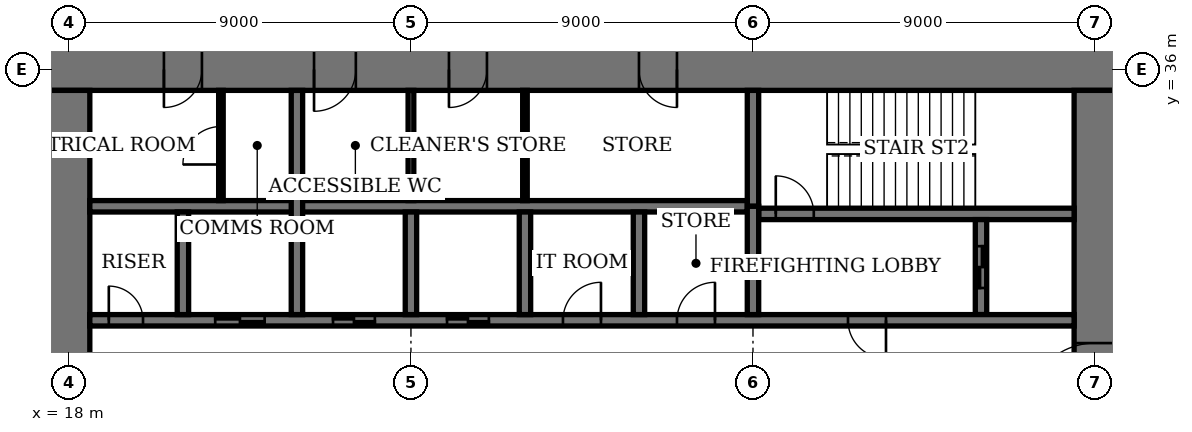
"""IFC4 building model, lengths in metres.
Left out: names, types, materials, properties, quantities, classifications, styles, units other than length and angle.
Written with IfcOpenShell. Run it as: python <this file> out.ifc"""

import sys

from ifc_helpers import new_model, si_unit, direction, frame, frame_2d, origin, place, context, subcontext, project, spatial, rectangle, extrude, element, fill, save


model = new_model("IFC4")
c1 = context("Model", 3, precision=1e-05, world=origin(), true_north=direction((0.0, 1.0)))
c2 = subcontext(c1, "Body", "Model", "MODEL_VIEW")
j1 = project(units=[si_unit("LENGTHUNIT", "METRE"), si_unit("PLANEANGLEUNIT", "RADIAN")], contexts=[c1])
p1 = place(None, origin())
s1 = spatial("IfcSite", under=j1, at=p1, CompositionType="ELEMENT")
p2 = place(p1, origin())
s2 = spatial("IfcBuilding", under=s1, at=p2, CompositionType="ELEMENT")
p3 = place(p2, frame((0.0, 0.0, 166.2)))
s3 = spatial("IfcBuildingStorey", under=s2, at=p3, CompositionType="ELEMENT", Elevation=166.2)
p4 = place(p3, frame((45.55, 36.0, 0.0), z_axis=(0.0, 0.0, 1.0), x_axis=(-1.0, 0.0, 0.0)))
e1 = element("IfcWall", 1, at=p4, inside=s3, PredefinedType="SHEAR", context=c2, shape_type="SweptSolid", body=[
    extrude(rectangle(XDim=28.1, YDim=1.1, at=frame_2d((14.05, 0.0))), origin(), (0.0, 0.0, 1.0), 4.0),
])
p5 = place(p4, frame((11.55, 0.0, 0.0)))
e2 = element("IfcOpeningElement", 2, at=p5, cuts=e1, PredefinedType="OPENING", context=c2, shape_type="SweptSolid", body=[
    extrude(rectangle(XDim=1.0, YDim=2.4, at=frame_2d((0.5, 1.2))), frame((0.0, 0.56, 0.0), z_axis=(0.0, -1.0, 0.0), x_axis=(1.0, 0.0, 0.0)), (0.0, 0.0, 1.0), 1.12),
])
p6 = place(p4, frame((16.55, 0.0, 0.0)))
e3 = element("IfcOpeningElement", 3, at=p6, cuts=e1, PredefinedType="OPENING", context=c2, shape_type="SweptSolid", body=[
    extrude(rectangle(XDim=1.0, YDim=2.4, at=frame_2d((0.5, 1.2))), frame((0.0, 0.56, 0.0), z_axis=(0.0, -1.0, 0.0), x_axis=(1.0, 0.0, 0.0)), (0.0, 0.0, 1.0), 1.12),
])
p7 = place(p4, frame((20.0, 0.0, 0.0)))
e4 = element("IfcOpeningElement", 4, at=p7, cuts=e1, PredefinedType="OPENING", context=c2, shape_type="SweptSolid", body=[
    extrude(rectangle(XDim=1.1, YDim=2.4, at=frame_2d((0.55, 1.2))), frame((0.0, 0.56, 0.0), z_axis=(0.0, -1.0, 0.0), x_axis=(1.0, 0.0, 0.0)), (0.0, 0.0, 1.0), 1.12),
])
p8 = place(p4, frame((24.05, 0.0, 0.0)))
e5 = element("IfcOpeningElement", 5, at=p8, cuts=e1, PredefinedType="OPENING", context=c2, shape_type="SweptSolid", body=[
    extrude(rectangle(XDim=1.0, YDim=2.4, at=frame_2d((0.5, 1.2))), frame((0.0, 0.56, 0.0), z_axis=(0.0, -1.0, 0.0), x_axis=(1.0, 0.0, 0.0)), (0.0, 0.0, 1.0), 1.12),
])
p9 = place(p3, frame((18.0, 35.45, 0.0), z_axis=(0.0, 0.0, 1.0), x_axis=(0.0, -1.0, 0.0)))
e6 = element("IfcWall", 6, at=p9, inside=s3, PredefinedType="SHEAR", context=c2, shape_type="SweptSolid", body=[
    extrude(rectangle(XDim=16.9, YDim=1.1, at=frame_2d((8.45, 0.0))), origin(), (0.0, 0.0, 1.0), 4.0),
])
p10 = place(p9, frame((8.45, 0.0, 0.0)))
e7 = element("IfcOpeningElement", 7, at=p10, cuts=e6, PredefinedType="OPENING", context=c2, shape_type="SweptSolid", body=[
    extrude(rectangle(XDim=1.8, YDim=2.4, at=frame_2d((0.9, 1.2))), frame((0.0, 0.56, 0.0), z_axis=(0.0, -1.0, 0.0), x_axis=(1.0, 0.0, 0.0)), (0.0, 0.0, 1.0), 1.12),
])
p11 = place(p3, frame((45.0, 18.55, 0.0), z_axis=(0.0, 0.0, 1.0), x_axis=(0.0, 1.0, 0.0)))
e8 = element("IfcWall", 8, at=p11, inside=s3, PredefinedType="SHEAR", context=c2, shape_type="SweptSolid", body=[
    extrude(rectangle(XDim=16.9, YDim=1.1, at=frame_2d((8.45, 0.0))), origin(), (0.0, 0.0, 1.0), 4.0),
])
p12 = place(p11, frame((8.45, 0.0, 0.0)))
e9 = element("IfcOpeningElement", 9, at=p12, cuts=e8, PredefinedType="OPENING", context=c2, shape_type="SweptSolid", body=[
    extrude(rectangle(XDim=1.8, YDim=2.4, at=frame_2d((0.9, 1.2))), frame((0.0, 0.56, 0.0), z_axis=(0.0, -1.0, 0.0), x_axis=(1.0, 0.0, 0.0)), (0.0, 0.0, 1.0), 1.12),
])
p13 = place(p3, frame((36.15, 32.2, 0.0), z_axis=(0.0, 0.0, 1.0), x_axis=(1.0, 0.0, 0.0)))
e10 = element("IfcWall", 10, at=p13, inside=s3, PredefinedType="SHEAR", context=c2, shape_type="SweptSolid", body=[
    extrude(rectangle(XDim=8.3, YDim=0.3, at=frame_2d((4.15, 0.0))), origin(), (0.0, 0.0, 1.0), 4.0),
])
p14 = place(p13, frame((0.45, 0.0, 0.0)))
e11 = element("IfcOpeningElement", 11, at=p14, cuts=e10, PredefinedType="OPENING", context=c2, shape_type="SweptSolid", body=[
    extrude(rectangle(XDim=1.0, YDim=2.4, at=frame_2d((0.5, 1.2))), frame((0.0, 0.16, 0.0), z_axis=(0.0, -1.0, 0.0), x_axis=(1.0, 0.0, 0.0)), (0.0, 0.0, 1.0), 0.32),
])
p15 = place(p3, frame((36.0, 32.4, 0.0), z_axis=(0.0, 0.0, 1.0), x_axis=(0.0, 1.0, 0.0)))
e12 = element("IfcWall", 12, at=p15, inside=s3, PredefinedType="SHEAR", context=c2, shape_type="SweptSolid", body=[
    extrude(rectangle(XDim=3.05, YDim=0.3, at=frame_2d((1.525, 0.0))), origin(), (0.0, 0.0, 1.0), 4.0),
])
p16 = place(p3, frame((42.0, 29.55, 0.0), z_axis=(0.0, 0.0, 1.0), x_axis=(0.0, 1.0, 0.0)))
e13 = element("IfcWall", 13, at=p16, inside=s3, PredefinedType="SHEAR", context=c2, shape_type="SweptSolid", body=[
    extrude(rectangle(XDim=2.5, YDim=0.3, at=frame_2d((1.25, 0.0))), origin(), (0.0, 0.0, 1.0), 4.0),
])
p17 = place(p16, frame((0.7, 0.0, 0.0)))
e14 = element("IfcOpeningElement", 14, at=p17, cuts=e13, PredefinedType="OPENING", context=c2, shape_type="SweptSolid", body=[
    extrude(rectangle(XDim=1.1, YDim=2.4, at=frame_2d((0.55, 1.2))), frame((0.0, 0.16, 0.0), z_axis=(0.0, -1.0, 0.0), x_axis=(1.0, 0.0, 0.0)), (0.0, 0.0, 1.0), 0.32),
])
p18 = place(p3, frame((18.55, 29.4, 0.0), z_axis=(0.0, 0.0, 1.0), x_axis=(1.0, 0.0, 0.0)))
e15 = element("IfcWall", 15, at=p18, inside=s3, PredefinedType="SHEAR", context=c2, shape_type="SweptSolid", body=[
    extrude(rectangle(XDim=25.9, YDim=0.3, at=frame_2d((12.95, 0.0))), origin(), (0.0, 0.0, 1.0), 4.0),
])
p19 = place(p18, frame((19.95, 0.0, 0.0)))
e16 = element("IfcOpeningElement", 16, at=p19, cuts=e15, PredefinedType="OPENING", context=c2, shape_type="SweptSolid", body=[
    extrude(rectangle(XDim=1.0, YDim=2.4, at=frame_2d((0.5, 1.2))), frame((0.0, 0.16, 0.0), z_axis=(0.0, -1.0, 0.0), x_axis=(1.0, 0.0, 0.0)), (0.0, 0.0, 1.0), 0.32),
])
p20 = place(p18, frame((0.5, 0.0, 0.0)))
e17 = element("IfcOpeningElement", 17, at=p20, cuts=e15, PredefinedType="OPENING", context=c2, shape_type="SweptSolid", body=[
    extrude(rectangle(XDim=0.9, YDim=2.1, at=frame_2d((0.45, 1.05))), frame((0.0, 0.16, 0.0), z_axis=(0.0, -1.0, 0.0), x_axis=(1.0, 0.0, 0.0)), (0.0, 0.0, 1.0), 0.32),
])
p21 = place(p18, frame((15.45, 0.0, 0.0)))
e18 = element("IfcOpeningElement", 18, at=p21, cuts=e15, PredefinedType="OPENING", context=c2, shape_type="SweptSolid", body=[
    extrude(rectangle(XDim=1.0, YDim=2.4, at=frame_2d((0.5, 1.2))), frame((0.0, 0.16, 0.0), z_axis=(0.0, -1.0, 0.0), x_axis=(1.0, 0.0, 0.0)), (0.0, 0.0, 1.0), 0.32),
])
p22 = place(p18, frame((12.45, 0.0, 0.0)))
e19 = element("IfcOpeningElement", 19, at=p22, cuts=e15, PredefinedType="OPENING", context=c2, shape_type="SweptSolid", body=[
    extrude(rectangle(XDim=1.0, YDim=2.4, at=frame_2d((0.5, 1.2))), frame((0.0, 0.16, 0.0), z_axis=(0.0, -1.0, 0.0), x_axis=(1.0, 0.0, 0.0)), (0.0, 0.0, 1.0), 0.32),
])
p23 = place(p18, frame((9.4, 0.0, 0.0)))
e20 = element("IfcOpeningElement", 20, at=p23, cuts=e15, PredefinedType="OPENING", context=c2, shape_type="SweptSolid", body=[
    extrude(rectangle(XDim=1.1, YDim=2.4, at=frame_2d((0.55, 1.2))), frame((0.0, 0.16, 0.0), z_axis=(0.0, -1.0, 0.0), x_axis=(1.0, 0.0, 0.0)), (0.0, 0.0, 1.0), 0.32),
])
p24 = place(p18, frame((6.4, 0.0, 0.0)))
e21 = element("IfcOpeningElement", 21, at=p24, cuts=e15, PredefinedType="OPENING", context=c2, shape_type="SweptSolid", body=[
    extrude(rectangle(XDim=1.1, YDim=2.4, at=frame_2d((0.55, 1.2))), frame((0.0, 0.16, 0.0), z_axis=(0.0, -1.0, 0.0), x_axis=(1.0, 0.0, 0.0)), (0.0, 0.0, 1.0), 0.32),
])
p25 = place(p18, frame((3.3, 0.0, 0.0)))
e22 = element("IfcOpeningElement", 22, at=p25, cuts=e15, PredefinedType="OPENING", context=c2, shape_type="SweptSolid", body=[
    extrude(rectangle(XDim=1.3, YDim=2.4, at=frame_2d((0.65, 1.2))), frame((0.0, 0.16, 0.0), z_axis=(0.0, -1.0, 0.0), x_axis=(1.0, 0.0, 0.0)), (0.0, 0.0, 1.0), 0.32),
])
p26 = place(p3, frame((18.55, 32.4, 0.0), z_axis=(0.0, 0.0, 1.0), x_axis=(1.0, 0.0, 0.0)))
e23 = element("IfcWall", 23, at=p26, inside=s3, PredefinedType="SHEAR", context=c2, shape_type="SweptSolid", body=[
    extrude(rectangle(XDim=17.3, YDim=0.3, at=frame_2d((8.65, 0.0))), origin(), (0.0, 0.0, 1.0), 4.0),
])
for number, where, z_axis, x_axis in (
    (24, (33.0, 29.55, 0.0), (0.0, 0.0, 1.0), (0.0, 1.0, 0.0)),
    (25, (30.0, 29.55, 0.0), (0.0, 0.0, 1.0), (0.0, 1.0, 0.0)),
    (26, (27.0, 29.55, 0.0), (0.0, 0.0, 1.0), (0.0, 1.0, 0.0)),
):
    element("IfcWall", number, at=place(p3, frame(where, z_axis=z_axis, x_axis=x_axis)), inside=s3, PredefinedType="SHEAR", context=c2, shape_type="SweptSolid", body=[
        extrude(rectangle(XDim=2.7, YDim=0.3, at=frame_2d((1.35, 0.0))), origin(), (0.0, 0.0, 1.0), 4.0),
    ])
p27 = place(p3, frame((24.0, 29.55, 0.0), z_axis=(0.0, 0.0, 1.0), x_axis=(0.0, 1.0, 0.0)))
e27 = element("IfcWall", 27, at=p27, inside=s3, PredefinedType="SHEAR", context=c2, shape_type="SweptSolid", body=[
    extrude(rectangle(XDim=5.9, YDim=0.3, at=frame_2d((2.95, 0.0))), origin(), (0.0, 0.0, 1.0), 4.0),
])
p28 = place(p3, frame((21.0, 29.55, 0.0), z_axis=(0.0, 0.0, 1.0), x_axis=(0.0, 1.0, 0.0)))
e28 = element("IfcWall", 28, at=p28, inside=s3, PredefinedType="SHEAR", context=c2, shape_type="SweptSolid", body=[
    extrude(rectangle(XDim=2.7, YDim=0.3, at=frame_2d((1.35, 0.0))), origin(), (0.0, 0.0, 1.0), 4.0),
])
p29 = place(p3, frame((36.0, 29.55, 0.0), z_axis=(0.0, 0.0, 1.0), x_axis=(0.0, 1.0, 0.0)))
e29 = element("IfcWall", 29, at=p29, inside=s3, PredefinedType="SHEAR", context=c2, shape_type="SweptSolid", body=[
    extrude(rectangle(XDim=2.85, YDim=0.3, at=frame_2d((1.425, 0.0))), origin(), (0.0, 0.0, 1.0), 4.0),
])
p30 = place(p3, frame((30.0, 32.55, 0.0), z_axis=(0.0, 0.0, 1.0), x_axis=(0.0, 1.0, 0.0)))
e30 = element("IfcWall", 30, at=p30, inside=s3, PredefinedType="PARTITIONING", context=c2, shape_type="SweptSolid", body=[
    extrude(rectangle(XDim=2.9, YDim=0.12, at=frame_2d((1.45, 0.0))), origin(), (0.0, 0.0, 1.0), 3.75),
])
p31 = place(p3, frame((27.0, 32.55, 0.0), z_axis=(0.0, 0.0, 1.0), x_axis=(0.0, 1.0, 0.0)))
e31 = element("IfcWall", 31, at=p31, inside=s3, PredefinedType="PARTITIONING", context=c2, shape_type="SweptSolid", body=[
    extrude(rectangle(XDim=2.9, YDim=0.15, at=frame_2d((1.45, 0.0))), origin(), (0.0, 0.0, 1.0), 3.75),
])
p32 = place(p3, frame((22.0, 32.55, 0.0), z_axis=(0.0, 0.0, 1.0), x_axis=(0.0, 1.0, 0.0)))
e32 = element("IfcWall", 32, at=p32, inside=s3, PredefinedType="PARTITIONING", context=c2, shape_type="SweptSolid", body=[
    extrude(rectangle(XDim=2.9, YDim=0.12, at=frame_2d((1.45, 0.0))), origin(), (0.0, 0.0, 1.0), 3.75),
])
p33 = place(p32, frame((0.95, 0.0, 0.0)))
e33 = element("IfcOpeningElement", 33, at=p33, cuts=e32, PredefinedType="OPENING", context=c2, shape_type="SweptSolid", body=[
    extrude(rectangle(XDim=1.0, YDim=2.4, at=frame_2d((0.5, 1.2))), frame((0.0, 0.07, 0.0), z_axis=(0.0, -1.0, 0.0), x_axis=(1.0, 0.0, 0.0)), (0.0, 0.0, 1.0), 0.14),
])
p34 = place(p12, origin())
e34 = element("IfcDoor", 34, at=p34, inside=s3, OperationType="DOUBLE_DOOR_DOUBLE_SWING", PredefinedType="DOOR", context=c2, shape_type="SweptSolid", body=[
    extrude(rectangle(XDim=1.8, YDim=2.4, at=frame_2d((0.9, 1.2))), frame((0.0, 0.03, 0.0), z_axis=(0.0, -1.0, 0.0), x_axis=(1.0, 0.0, 0.0)), (0.0, 0.0, 1.0), 0.06),
    extrude(rectangle(XDim=0.04, YDim=2.4, at=frame_2d((0.02, 1.2))), frame((0.0, 0.55, 0.0), z_axis=(0.0, -1.0, 0.0), x_axis=(1.0, 0.0, 0.0)), (0.0, 0.0, 1.0), 1.1),
    extrude(rectangle(XDim=0.04, YDim=2.4, at=frame_2d((1.78, 1.2))), frame((0.0, 0.55, 0.0), z_axis=(0.0, -1.0, 0.0), x_axis=(1.0, 0.0, 0.0)), (0.0, 0.0, 1.0), 1.1),
    extrude(rectangle(XDim=1.8, YDim=0.04, at=frame_2d((0.9, 2.38))), frame((0.0, 0.55, 0.0), z_axis=(0.0, -1.0, 0.0), x_axis=(1.0, 0.0, 0.0)), (0.0, 0.0, 1.0), 1.1),
])
fill(e9, e34)
p35 = place(p5, origin())
e35 = element("IfcDoor", 35, at=p35, inside=s3, OperationType="SINGLE_SWING_RIGHT", PredefinedType="DOOR", context=c2, shape_type="SweptSolid", body=[
    extrude(rectangle(XDim=1.0, YDim=2.4, at=frame_2d((0.5, 1.2))), frame((0.0, 0.025, 0.0), z_axis=(0.0, -1.0, 0.0), x_axis=(1.0, 0.0, 0.0)), (0.0, 0.0, 1.0), 0.05),
    extrude(rectangle(XDim=0.04, YDim=2.4, at=frame_2d((0.02, 1.2))), frame((0.0, 0.4, 0.0), z_axis=(0.0, -1.0, 0.0), x_axis=(1.0, 0.0, 0.0)), (0.0, 0.0, 1.0), 0.8),
    extrude(rectangle(XDim=0.04, YDim=2.4, at=frame_2d((0.98, 1.2))), frame((0.0, 0.4, 0.0), z_axis=(0.0, -1.0, 0.0), x_axis=(1.0, 0.0, 0.0)), (0.0, 0.0, 1.0), 0.8),
    extrude(rectangle(XDim=1.0, YDim=0.04, at=frame_2d((0.5, 2.38))), frame((0.0, 0.4, 0.0), z_axis=(0.0, -1.0, 0.0), x_axis=(1.0, 0.0, 0.0)), (0.0, 0.0, 1.0), 0.8),
])
fill(e2, e35)
p36 = place(p6, origin())
e36 = element("IfcDoor", 36, at=p36, inside=s3, OperationType="SINGLE_SWING_LEFT", PredefinedType="DOOR", context=c2, shape_type="SweptSolid", body=[
    extrude(rectangle(XDim=1.0, YDim=2.4, at=frame_2d((0.5, 1.2))), frame((0.0, 0.025, 0.0), z_axis=(0.0, -1.0, 0.0), x_axis=(1.0, 0.0, 0.0)), (0.0, 0.0, 1.0), 0.05),
    extrude(rectangle(XDim=0.04, YDim=2.4, at=frame_2d((0.02, 1.2))), frame((0.0, 0.4, 0.0), z_axis=(0.0, -1.0, 0.0), x_axis=(1.0, 0.0, 0.0)), (0.0, 0.0, 1.0), 0.8),
    extrude(rectangle(XDim=0.04, YDim=2.4, at=frame_2d((0.98, 1.2))), frame((0.0, 0.4, 0.0), z_axis=(0.0, -1.0, 0.0), x_axis=(1.0, 0.0, 0.0)), (0.0, 0.0, 1.0), 0.8),
    extrude(rectangle(XDim=1.0, YDim=0.04, at=frame_2d((0.5, 2.38))), frame((0.0, 0.4, 0.0), z_axis=(0.0, -1.0, 0.0), x_axis=(1.0, 0.0, 0.0)), (0.0, 0.0, 1.0), 0.8),
])
fill(e3, e36)
p37 = place(p7, origin())
e37 = element("IfcDoor", 37, at=p37, inside=s3, OperationType="SINGLE_SWING_LEFT", PredefinedType="DOOR", context=c2, shape_type="SweptSolid", body=[
    extrude(rectangle(XDim=1.1, YDim=2.4, at=frame_2d((0.55, 1.2))), frame((0.0, 0.025, 0.0), z_axis=(0.0, -1.0, 0.0), x_axis=(1.0, 0.0, 0.0)), (0.0, 0.0, 1.0), 0.05),
    extrude(rectangle(XDim=0.04, YDim=2.4, at=frame_2d((0.02, 1.2))), frame((0.0, 0.44, 0.0), z_axis=(0.0, -1.0, 0.0), x_axis=(1.0, 0.0, 0.0)), (0.0, 0.0, 1.0), 0.88),
    extrude(rectangle(XDim=0.04, YDim=2.4, at=frame_2d((1.08, 1.2))), frame((0.0, 0.44, 0.0), z_axis=(0.0, -1.0, 0.0), x_axis=(1.0, 0.0, 0.0)), (0.0, 0.0, 1.0), 0.88),
    extrude(rectangle(XDim=1.1, YDim=0.04, at=frame_2d((0.55, 2.38))), frame((0.0, 0.44, 0.0), z_axis=(0.0, -1.0, 0.0), x_axis=(1.0, 0.0, 0.0)), (0.0, 0.0, 1.0), 0.88),
])
fill(e4, e37)
p38 = place(p8, origin())
e38 = element("IfcDoor", 38, at=p38, inside=s3, OperationType="SINGLE_SWING_LEFT", PredefinedType="DOOR", context=c2, shape_type="SweptSolid", body=[
    extrude(rectangle(XDim=1.0, YDim=2.4, at=frame_2d((0.5, 1.2))), frame((0.0, 0.025, 0.0), z_axis=(0.0, -1.0, 0.0), x_axis=(1.0, 0.0, 0.0)), (0.0, 0.0, 1.0), 0.05),
    extrude(rectangle(XDim=0.04, YDim=2.4, at=frame_2d((0.02, 1.2))), frame((0.0, 0.4, 0.0), z_axis=(0.0, -1.0, 0.0), x_axis=(1.0, 0.0, 0.0)), (0.0, 0.0, 1.0), 0.8),
    extrude(rectangle(XDim=0.04, YDim=2.4, at=frame_2d((0.98, 1.2))), frame((0.0, 0.4, 0.0), z_axis=(0.0, -1.0, 0.0), x_axis=(1.0, 0.0, 0.0)), (0.0, 0.0, 1.0), 0.8),
    extrude(rectangle(XDim=1.0, YDim=0.04, at=frame_2d((0.5, 2.38))), frame((0.0, 0.4, 0.0), z_axis=(0.0, -1.0, 0.0), x_axis=(1.0, 0.0, 0.0)), (0.0, 0.0, 1.0), 0.8),
])
fill(e5, e38)
p39 = place(p14, origin())
e39 = element("IfcDoor", 39, at=p39, inside=s3, OperationType="SINGLE_SWING_RIGHT", PredefinedType="DOOR", context=c2, shape_type="SweptSolid", body=[
    extrude(rectangle(XDim=1.0, YDim=2.4, at=frame_2d((0.5, 1.2))), frame((0.0, 0.03, 0.0), z_axis=(0.0, -1.0, 0.0), x_axis=(1.0, 0.0, 0.0)), (0.0, 0.0, 1.0), 0.06),
])
fill(e11, e39)
p40 = place(p19, origin())
e40 = element("IfcDoor", 40, at=p40, inside=s3, OperationType="SINGLE_SWING_RIGHT", PredefinedType="DOOR", context=c2, shape_type="SweptSolid", body=[
    extrude(rectangle(XDim=1.0, YDim=2.4, at=frame_2d((0.5, 1.2))), frame((0.0, 0.03, 0.0), z_axis=(0.0, -1.0, 0.0), x_axis=(1.0, 0.0, 0.0)), (0.0, 0.0, 1.0), 0.06),
])
fill(e16, e40)
p41 = place(p20, origin())
e41 = element("IfcDoor", 41, at=p41, inside=s3, OperationType="SINGLE_SWING_RIGHT", PredefinedType="DOOR", context=c2, shape_type="SweptSolid", body=[
    extrude(rectangle(XDim=0.9, YDim=2.1, at=frame_2d((0.45, 1.05))), frame((0.0, 0.03, 0.0), z_axis=(0.0, -1.0, 0.0), x_axis=(1.0, 0.0, 0.0)), (0.0, 0.0, 1.0), 0.06),
])
fill(e17, e41)
p42 = place(p33, origin())
e42 = element("IfcDoor", 42, at=p42, inside=s3, OperationType="SINGLE_SWING_RIGHT", PredefinedType="DOOR", context=c2, shape_type="SweptSolid", body=[
    extrude(rectangle(XDim=1.0, YDim=2.4, at=frame_2d((0.5, 1.2))), frame((0.0, 0.03, 0.0), z_axis=(0.0, -1.0, 0.0), x_axis=(1.0, 0.0, 0.0)), (0.0, 0.0, 1.0), 0.06),
])
fill(e33, e42)
p43 = place(p21, origin())
e43 = element("IfcDoor", 43, at=p43, inside=s3, OperationType="SINGLE_SWING_LEFT", PredefinedType="DOOR", context=c2, shape_type="SweptSolid", body=[
    extrude(rectangle(XDim=1.0, YDim=2.4, at=frame_2d((0.5, 1.2))), frame((0.0, 0.03, 0.0), z_axis=(0.0, -1.0, 0.0), x_axis=(1.0, 0.0, 0.0)), (0.0, 0.0, 1.0), 0.06),
])
fill(e18, e43)
p44 = place(p22, origin())
e44 = element("IfcDoor", 44, at=p44, inside=s3, OperationType="SINGLE_SWING_LEFT", PredefinedType="DOOR", context=c2, shape_type="SweptSolid", body=[
    extrude(rectangle(XDim=1.0, YDim=2.4, at=frame_2d((0.5, 1.2))), frame((0.0, 0.03, 0.0), z_axis=(0.0, -1.0, 0.0), x_axis=(1.0, 0.0, 0.0)), (0.0, 0.0, 1.0), 0.06),
])
fill(e19, e44)
p45 = place(p23, origin())
e45 = element("IfcDoor", 45, at=p45, inside=s3, OperationType="DOUBLE_DOOR_SLIDING", PredefinedType="DOOR", context=c2, shape_type="SweptSolid", body=[
    extrude(rectangle(XDim=1.1, YDim=2.4, at=frame_2d((0.55, 1.2))), frame((0.0, 0.02, 0.0), z_axis=(0.0, -1.0, 0.0), x_axis=(1.0, 0.0, 0.0)), (0.0, 0.0, 1.0), 0.04),
])
fill(e20, e45)
p46 = place(p24, origin())
e46 = element("IfcDoor", 46, at=p46, inside=s3, OperationType="DOUBLE_DOOR_SLIDING", PredefinedType="DOOR", context=c2, shape_type="SweptSolid", body=[
    extrude(rectangle(XDim=1.1, YDim=2.4, at=frame_2d((0.55, 1.2))), frame((0.0, 0.02, 0.0), z_axis=(0.0, -1.0, 0.0), x_axis=(1.0, 0.0, 0.0)), (0.0, 0.0, 1.0), 0.04),
])
fill(e21, e46)
p47 = place(p25, origin())
e47 = element("IfcDoor", 47, at=p47, inside=s3, OperationType="DOUBLE_DOOR_SLIDING", PredefinedType="DOOR", context=c2, shape_type="SweptSolid", body=[
    extrude(rectangle(XDim=1.3, YDim=2.4, at=frame_2d((0.65, 1.2))), frame((0.0, 0.02, 0.0), z_axis=(0.0, -1.0, 0.0), x_axis=(1.0, 0.0, 0.0)), (0.0, 0.0, 1.0), 0.04),
])
fill(e22, e47)
p48 = place(p17, origin())
e48 = element("IfcDoor", 48, at=p48, inside=s3, OperationType="DOUBLE_DOOR_SLIDING", PredefinedType="DOOR", context=c2, shape_type="SweptSolid", body=[
    extrude(rectangle(XDim=1.1, YDim=2.4, at=frame_2d((0.55, 1.2))), frame((0.0, 0.03, 0.0), z_axis=(0.0, -1.0, 0.0), x_axis=(1.0, 0.0, 0.0)), (0.0, 0.0, 1.0), 0.06),
])
fill(e14, e48)
save(model, sys.argv[1])
